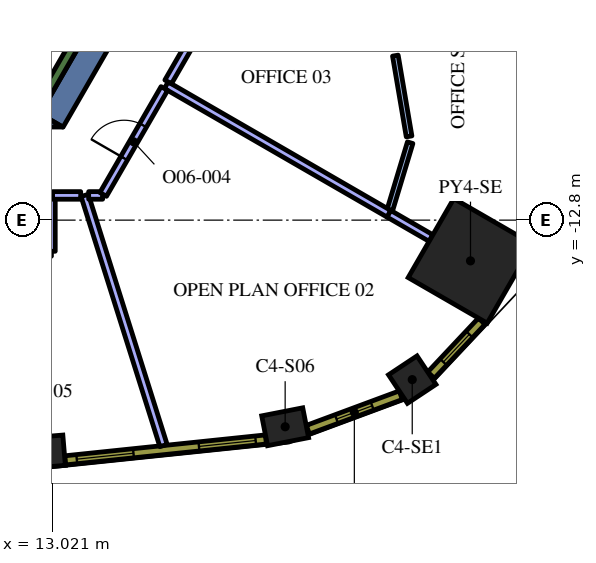
"""IFC4 building model, lengths in metres.
Left out: names, types, materials, properties, quantities, classifications, styles, units other than length and angle.
Written with IfcOpenShell. Run it as: python <this file> out.ifc"""

import sys

from ifc_helpers import new_model, si_unit, direction, frame, frame_2d, origin, origin_2d, place, context, subcontext, project, spatial, polyline, rectangle, outline, extrude, element, fill, save


model = new_model("IFC4")
c1 = context("Model", 3, precision=1e-05, world=origin(), true_north=direction((0.0, 1.0)))
c2 = subcontext(c1, "Body", "Model", "MODEL_VIEW")
j1 = project(units=[si_unit("LENGTHUNIT", "METRE"), si_unit("PLANEANGLEUNIT", "RADIAN")], contexts=[c1])
p1 = place(None, origin())
s1 = spatial("IfcSite", under=j1, at=p1, CompositionType="ELEMENT")
p2 = place(p1, origin())
s2 = spatial("IfcBuilding", under=s1, at=p2, CompositionType="ELEMENT")
p3 = place(p2, frame((0.0, 0.0, 205.8)))
s3 = spatial("IfcBuildingStorey", under=s2, at=p3, CompositionType="ELEMENT", Elevation=205.8)
p4 = place(p3, frame((24.027, -13.872, 0.0), z_axis=(0.0, 0.0, 1.0), x_axis=(0.866025403784, -0.5, 0.0)))
e1 = element("IfcColumn", 1, at=p4, inside=s3, PredefinedType="COLUMN", context=c2, shape_type="SweptSolid", body=[
    extrude(rectangle(XDim=2.4, YDim=2.4, at=origin_2d()), origin(), (0.0, 0.0, 1.0), 4.2),
])
for number, where, z_axis, x_axis in (
    (2, (12.785, -18.9, 0.0), (0.0, 0.0, 1.0), (0.997, 0.083, 0.0)),
    (3, (19.15, -18.237, 0.0), (0.0, 0.0, 1.0), (0.981, 0.192, 0.0)),
):
    element("IfcColumn", number, at=place(p3, frame(where, z_axis=z_axis, x_axis=x_axis)), inside=s3, PredefinedType="COLUMN", context=c2, shape_type="SweptSolid", body=[
        extrude(rectangle(XDim=1.1, YDim=0.8, at=origin_2d()), origin(), (0.0, 0.0, 1.0), 4.2),
    ])
p5 = place(p3, frame((22.494, -16.997, 0.0), z_axis=(0.0, 0.0, 1.0), x_axis=(0.833238868178, 0.552913183563, 0.0)))
e4 = element("IfcColumn", 4, at=p5, inside=s3, PredefinedType="COLUMN", context=c2, shape_type="SweptSolid", body=[
    extrude(rectangle(XDim=0.9, YDim=0.9, at=origin_2d()), origin(), (0.0, 0.0, 1.0), 4.2),
])
p6 = place(p3, frame((13.003, -10.179, 0.0), z_axis=(0.0, 0.0, 1.0), x_axis=(0.499972675833, 0.866041178825, 0.0)))
e5 = element("IfcWall", 5, at=p6, inside=s3, PredefinedType="SOLIDWALL", context=c2, shape_type="SweptSolid", body=[
    extrude(rectangle(XDim=3.829, YDim=0.7, at=frame_2d((1.915, 0.0))), origin(), (0.0, 0.0, 1.0), 4.2),
])
p7 = place(p3, origin())
e6 = element("IfcWall", 6, at=p7, inside=s3, PredefinedType="SOLIDWALL", context=c2, shape_type="SweptSolid", body=[
    extrude(outline(polyline([(12.698, -10.005), (13.296, -10.35), (12.5, -10.35), (12.698, -10.005)])), origin(), (0.0, 0.0, 1.0), 4.2),
])
p8 = place(p3, frame((12.84, -9.511, 0.0), z_axis=(0.0, 0.0, 1.0), x_axis=(0.500048121057, 0.865997619297, 0.0)))
e7 = element("IfcWall", 7, at=p8, inside=s3, PredefinedType="SOLIDWALL", context=c2, shape_type="SweptSolid", body=[
    extrude(rectangle(XDim=3.634, YDim=0.25, at=frame_2d((1.817, 0.0))), origin(), (0.0, 0.0, 1.0), 4.2),
])
p9 = place(p3, frame((13.875, -12.15, 0.0), z_axis=(0.0, 0.0, 1.0), x_axis=(0.3005606746, -0.953762696316, 0.0)))
e8 = element("IfcWall", 8, at=p9, inside=s3, PredefinedType="PARTITIONING", context=c2, shape_type="SweptSolid", body=[
    extrude(rectangle(XDim=6.9, YDim=0.2, at=frame_2d((3.45, 0.0))), origin(), (0.0, 0.0, 1.0), 3.45),
])
p10 = place(p3, frame((13.0, -13.62, 0.0), z_axis=(0.0, 0.0, 1.0), x_axis=(0.0, 1.0, 0.0)))
e9 = element("IfcWall", 9, at=p10, inside=s3, PredefinedType="PARTITIONING", context=c2, shape_type="SweptSolid", body=[
    extrude(rectangle(XDim=1.47, YDim=0.2, at=frame_2d((0.735, 0.0))), origin(), (0.0, 0.0, 1.0), 3.45),
])
p11 = place(p3, frame((13.03, -12.15, 0.0), z_axis=(0.0, 0.0, 1.0), x_axis=(1.0, 0.0, 0.0)))
e10 = element("IfcWall", 10, at=p11, inside=s3, PredefinedType="PARTITIONING", context=c2, shape_type="SweptSolid", body=[
    extrude(rectangle(XDim=0.74, YDim=0.2, at=frame_2d((0.37, 0.0))), origin(), (0.0, 0.0, 1.0), 3.45),
])
p12 = place(p3, frame((21.873, -12.628, 0.0), z_axis=(0.0, 0.0, 1.0), x_axis=(0.866052988967, -0.499952218018, 0.0)))
e11 = element("IfcWall", 11, at=p12, inside=s3, PredefinedType="PARTITIONING", context=c2, shape_type="SweptSolid", body=[
    extrude(rectangle(XDim=1.288, YDim=0.2, at=frame_2d((0.644, 0.0))), origin(), (0.0, 0.0, 1.0), 3.45),
])
p13 = place(p3, frame((16.021, -9.25, 0.0), z_axis=(0.0, 0.0, 1.0), x_axis=(0.86602692059, -0.499997372806, 0.0)))
e12 = element("IfcWall", 12, at=p13, inside=s3, PredefinedType="PARTITIONING", context=c2, shape_type="SweptSolid", body=[
    extrude(rectangle(XDim=6.765, YDim=0.2, at=frame_2d((3.382, 0.0))), origin(), (0.0, 0.0, 1.0), 3.45),
])
p14 = place(p3, frame((13.98, -12.15, 0.0), z_axis=(0.0, 0.0, 1.0), x_axis=(1.0, 0.0, 0.0)))
e13 = element("IfcWall", 13, at=p14, inside=s3, PredefinedType="PARTITIONING", context=c2, shape_type="SweptSolid", body=[
    extrude(rectangle(XDim=0.367, YDim=0.2, at=frame_2d((0.184, 0.0))), origin(), (0.0, 0.0, 1.0), 3.45),
])
p15 = place(p3, frame((14.362, -12.124, 0.0), z_axis=(0.0, 0.0, 1.0), x_axis=(0.500022299258, 0.866012528919, 0.0)))
e14 = element("IfcWall", 14, at=p15, inside=s3, PredefinedType="PARTITIONING", context=c2, shape_type="SweptSolid", body=[
    extrude(rectangle(XDim=3.219, YDim=0.2, at=frame_2d((1.609, 0.0))), origin(), (0.0, 0.0, 1.0), 3.45),
])
p16 = place(p15, frame((1.1, 0.0, 0.0)))
e15 = element("IfcOpeningElement", 15, at=p16, cuts=e14, PredefinedType="OPENING", context=c2, shape_type="SweptSolid", body=[
    extrude(rectangle(XDim=1.0, YDim=2.1, at=frame_2d((0.5, 1.05))), frame((0.0, 0.11, 0.0), z_axis=(0.0, -1.0, 0.0), x_axis=(1.0, 0.0, 0.0)), (0.0, 0.0, 1.0), 0.22),
])
p17 = place(p3, frame((21.906, -12.532, 0.0), z_axis=(0.0, 0.0, 1.0), x_axis=(0.288789848591, 0.957392512688, 0.0)))
e16 = element("IfcWall", 16, at=p17, inside=s3, PredefinedType="PARTITIONING", context=c2, shape_type="SweptSolid", body=[
    extrude(rectangle(XDim=1.848, YDim=0.15, at=frame_2d((0.924, 0.0))), origin(), (0.0, 0.0, 1.0), 3.45),
])
p18 = place(p3, frame((22.412, -10.597, 0.0), z_axis=(0.0, 0.0, 1.0), x_axis=(-0.167612004459, 0.985853039738, 0.0)))
e17 = element("IfcWall", 17, at=p18, inside=s3, PredefinedType="PARTITIONING", context=c2, shape_type="SweptSolid", body=[
    extrude(rectangle(XDim=2.156, YDim=0.15, at=frame_2d((1.078, 0.0))), origin(), (0.0, 0.0, 1.0), 3.45),
])
p19 = place(p3, frame((16.072, -9.163, 0.0), z_axis=(0.0, 0.0, 1.0), x_axis=(0.500010870188, 0.866019127788, 0.0)))
e18 = element("IfcWall", 18, at=p19, inside=s3, PredefinedType="PARTITIONING", context=c2, shape_type="SweptSolid", body=[
    extrude(rectangle(XDim=3.249, YDim=0.2, at=frame_2d((1.624, 0.0))), origin(), (0.0, 0.0, 1.0), 3.45),
])
p20 = place(p3, frame((13.362, -19.121, 0.0), z_axis=(0.0, 0.0, 1.0), x_axis=(0.994621961215, 0.103571976272, 0.0)))
e19 = element("IfcWall", 19, at=p20, inside=s3, PredefinedType="SOLIDWALL", context=c2, shape_type="SweptSolid", body=[
    extrude(rectangle(XDim=5.311, YDim=0.24, at=frame_2d((2.655, 0.0))), origin(), (0.0, 0.0, 1.0), 3.95),
])
p21 = place(p20, frame((0.306, 0.0, 0.9)))
e20 = element("IfcOpeningElement", 20, at=p21, cuts=e19, PredefinedType="OPENING", context=c2, shape_type="SweptSolid", body=[
    extrude(rectangle(XDim=1.5, YDim=2.55, at=frame_2d((0.75, 1.275))), frame((0.0, 0.13, 0.0), z_axis=(0.0, -1.0, 0.0), x_axis=(1.0, 0.0, 0.0)), (0.0, 0.0, 1.0), 0.26),
])
p22 = place(p20, frame((3.539, 0.0, 0.9)))
e21 = element("IfcOpeningElement", 21, at=p22, cuts=e19, PredefinedType="OPENING", context=c2, shape_type="SweptSolid", body=[
    extrude(rectangle(XDim=1.5, YDim=2.55, at=frame_2d((0.75, 1.275))), frame((0.0, 0.13, 0.0), z_axis=(0.0, -1.0, 0.0), x_axis=(1.0, 0.0, 0.0)), (0.0, 0.0, 1.0), 0.26),
])
p23 = place(p3, frame((19.748, -18.314, 0.0), z_axis=(0.0, 0.0, 1.0), x_axis=(0.937569171184, 0.347798863203, 0.0)))
e22 = element("IfcWall", 22, at=p23, inside=s3, PredefinedType="SOLIDWALL", context=c2, shape_type="SweptSolid", body=[
    extrude(rectangle(XDim=2.609, YDim=0.24, at=frame_2d((1.305, 0.0))), origin(), (0.0, 0.0, 1.0), 3.95),
])
p24 = place(p23, frame((0.805, 0.0, 0.9)))
e23 = element("IfcOpeningElement", 23, at=p24, cuts=e22, PredefinedType="OPENING", context=c2, shape_type="SweptSolid", body=[
    extrude(rectangle(XDim=1.0, YDim=2.55, at=frame_2d((0.5, 1.275))), frame((0.0, 0.13, 0.0), z_axis=(0.0, -1.0, 0.0), x_axis=(1.0, 0.0, 0.0)), (0.0, 0.0, 1.0), 0.26),
])
p25 = place(p3, frame((22.989, -16.879, 0.0), z_axis=(0.0, 0.0, 1.0), x_axis=(0.684770274166, 0.728758994194, 0.0)))
e24 = element("IfcWall", 24, at=p25, inside=s3, PredefinedType="SOLIDWALL", context=c2, shape_type="SweptSolid", body=[
    extrude(rectangle(XDim=1.948, YDim=0.24, at=frame_2d((0.974, 0.0))), origin(), (0.0, 0.0, 1.0), 3.95),
])
p26 = place(p25, frame((0.474, 0.0, 0.9)))
e25 = element("IfcOpeningElement", 25, at=p26, cuts=e24, PredefinedType="OPENING", context=c2, shape_type="SweptSolid", body=[
    extrude(rectangle(XDim=1.0, YDim=2.55, at=frame_2d((0.5, 1.275))), frame((0.0, 0.13, 0.0), z_axis=(0.0, -1.0, 0.0), x_axis=(1.0, 0.0, 0.0)), (0.0, 0.0, 1.0), 0.26),
])
p27 = place(p16, origin())
e26 = element("IfcDoor", 26, at=p27, inside=s3, OperationType="SINGLE_SWING_LEFT", PredefinedType="DOOR", context=c2, shape_type="SweptSolid", body=[
    extrude(rectangle(XDim=1.0, YDim=2.1, at=frame_2d((0.5, 1.05))), frame((0.0, 0.025, 0.0), z_axis=(0.0, -1.0, 0.0), x_axis=(1.0, 0.0, 0.0)), (0.0, 0.0, 1.0), 0.05),
])
fill(e15, e26)
p28 = place(p21, origin())
e27 = element("IfcWindow", 27, at=p28, inside=s3, PartitioningType="SINGLE_PANEL", PredefinedType="WINDOW", context=c2, shape_type="SweptSolid", body=[
    extrude(rectangle(XDim=1.5, YDim=2.55, at=frame_2d((0.75, 1.275))), frame((0.0, 0.04, 0.0), z_axis=(0.0, -1.0, 0.0), x_axis=(1.0, 0.0, 0.0)), (0.0, 0.0, 1.0), 0.06),
])
fill(e20, e27)
p29 = place(p22, origin())
e28 = element("IfcWindow", 28, at=p29, inside=s3, PartitioningType="SINGLE_PANEL", PredefinedType="WINDOW", context=c2, shape_type="SweptSolid", body=[
    extrude(rectangle(XDim=1.5, YDim=2.55, at=frame_2d((0.75, 1.275))), frame((0.0, 0.04, 0.0), z_axis=(0.0, -1.0, 0.0), x_axis=(1.0, 0.0, 0.0)), (0.0, 0.0, 1.0), 0.06),
])
fill(e21, e28)
p30 = place(p24, origin())
e29 = element("IfcWindow", 29, at=p30, inside=s3, PartitioningType="SINGLE_PANEL", PredefinedType="WINDOW", context=c2, shape_type="SweptSolid", body=[
    extrude(rectangle(XDim=1.0, YDim=2.55, at=frame_2d((0.5, 1.275))), frame((0.0, 0.04, 0.0), z_axis=(0.0, -1.0, 0.0), x_axis=(1.0, 0.0, 0.0)), (0.0, 0.0, 1.0), 0.06),
])
fill(e23, e29)
p31 = place(p26, origin())
e30 = element("IfcWindow", 30, at=p31, inside=s3, PartitioningType="SINGLE_PANEL", PredefinedType="WINDOW", context=c2, shape_type="SweptSolid", body=[
    extrude(rectangle(XDim=1.0, YDim=2.55, at=frame_2d((0.5, 1.275))), frame((0.0, 0.04, 0.0), z_axis=(0.0, -1.0, 0.0), x_axis=(1.0, 0.0, 0.0)), (0.0, 0.0, 1.0), 0.06),
])
fill(e25, e30)
save(model, sys.argv[1])
